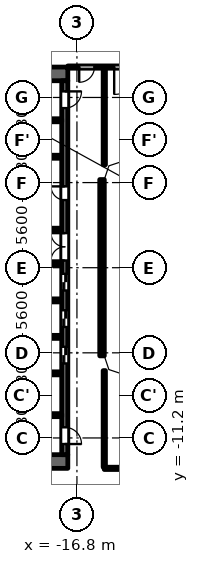
"""IFC4 building model, lengths in metres.
Left out: names, types, materials, properties, quantities, classifications, styles, units other than length and angle.
Written with IfcOpenShell. Run it as: python <this file> out.ifc"""

import sys

from ifc_helpers import new_model, si_unit, direction, frame, frame_2d, origin, place, context, subcontext, project, spatial, polyline, rectangle, outline, extrude, element, fill, save


model = new_model("IFC4")
c1 = context("Model", 3, precision=1e-05, world=origin(), true_north=direction((0.0, 1.0)))
c2 = subcontext(c1, "Body", "Model", "MODEL_VIEW")
j1 = project(units=[si_unit("LENGTHUNIT", "METRE"), si_unit("PLANEANGLEUNIT", "RADIAN")], contexts=[c1])
p1 = place(None, origin())
s1 = spatial("IfcSite", under=j1, at=p1, CompositionType="ELEMENT")
p2 = place(p1, origin())
s2 = spatial("IfcBuilding", under=s1, at=p2, CompositionType="ELEMENT")
p3 = place(p2, frame((0.0, 0.0, 20.9)))
s3 = spatial("IfcBuildingStorey", under=s2, at=p3, CompositionType="ELEMENT", Elevation=20.9)
p4 = place(p3, frame((-15.15, -5.8, 0.0), z_axis=(0.0, 0.0, 1.0), x_axis=(0.0, 1.0, 0.0)))
e1 = element("IfcWall", 1, at=p4, inside=s3, PredefinedType="SOLIDWALL", context=c2, shape_type="SweptSolid", body=[
    extrude(rectangle(XDim=11.6, YDim=0.3, at=frame_2d((5.8, 0.0))), origin(), (0.0, 0.0, 1.0), 4.45),
])
for number, where, z_axis, x_axis in (
    (2, (-17.4, 12.75, 0.0), (0.0, 0.0, 1.0), (-1.0, 0.0, 0.0)),
    (3, (-17.4, -12.75, 0.0), (0.0, 0.0, 1.0), (-1.0, 0.0, 0.0)),
):
    element("IfcWall", number, at=place(p3, frame(where, z_axis=z_axis, x_axis=x_axis)), inside=s3, PredefinedType="SHEAR", context=c2, shape_type="SweptSolid", body=[
        extrude(rectangle(XDim=10.4, YDim=0.9, at=frame_2d((5.2, 0.0))), origin(), (0.0, 0.0, 1.0), 4.45),
    ])
p5 = place(p3, frame((-17.6, -12.3, 0.0), z_axis=(0.0, 0.0, 1.0), x_axis=(0.0, 1.0, 0.0)))
e4 = element("IfcWall", 4, at=p5, inside=s3, PredefinedType="SHEAR", context=c2, shape_type="SweptSolid", body=[
    extrude(rectangle(XDim=24.6, YDim=0.4, at=frame_2d((12.3, 0.0))), origin(), (0.0, 0.0, 1.0), 4.45),
])
p6 = place(p5, frame((6.0, 0.0, 0.0)))
e5 = element("IfcOpeningElement", 5, at=p6, cuts=e4, PredefinedType="OPENING", context=c2, shape_type="SweptSolid", body=[
    extrude(rectangle(XDim=1.1, YDim=2.1, at=frame_2d((0.55, 1.05))), frame((0.0, 0.21, 0.0), z_axis=(0.0, -1.0, 0.0), x_axis=(1.0, 0.0, 0.0)), (0.0, 0.0, 1.0), 0.42),
])
p7 = place(p5, frame((8.4, 0.0, 0.0)))
e6 = element("IfcOpeningElement", 6, at=p7, cuts=e4, PredefinedType="OPENING", context=c2, shape_type="SweptSolid", body=[
    extrude(rectangle(XDim=1.1, YDim=2.1, at=frame_2d((0.55, 1.05))), frame((0.0, 0.21, 0.0), z_axis=(0.0, -1.0, 0.0), x_axis=(1.0, 0.0, 0.0)), (0.0, 0.0, 1.0), 0.42),
])
p8 = place(p5, frame((10.8, 0.0, 0.0)))
e7 = element("IfcOpeningElement", 7, at=p8, cuts=e4, PredefinedType="OPENING", context=c2, shape_type="SweptSolid", body=[
    extrude(rectangle(XDim=1.1, YDim=2.1, at=frame_2d((0.55, 1.05))), frame((0.0, 0.21, 0.0), z_axis=(0.0, -1.0, 0.0), x_axis=(1.0, 0.0, 0.0)), (0.0, 0.0, 1.0), 0.42),
])
p9 = place(p5, frame((16.75, 0.0, 0.0)))
e8 = element("IfcOpeningElement", 8, at=p9, cuts=e4, PredefinedType="OPENING", context=c2, shape_type="SweptSolid", body=[
    extrude(rectangle(XDim=0.9, YDim=2.1, at=frame_2d((0.45, 1.05))), frame((0.0, 0.21, 0.0), z_axis=(0.0, -1.0, 0.0), x_axis=(1.0, 0.0, 0.0)), (0.0, 0.0, 1.0), 0.42),
])
p10 = place(p5, frame((22.8, 0.0, 0.0)))
e9 = element("IfcOpeningElement", 9, at=p10, cuts=e4, PredefinedType="OPENING", context=c2, shape_type="SweptSolid", body=[
    extrude(rectangle(XDim=1.1, YDim=2.1, at=frame_2d((0.55, 1.05))), frame((0.0, 0.21, 0.0), z_axis=(0.0, -1.0, 0.0), x_axis=(1.0, 0.0, 0.0)), (0.0, 0.0, 1.0), 0.42),
])
p11 = place(p5, frame((0.7, 0.0, 0.0)))
e10 = element("IfcOpeningElement", 10, at=p11, cuts=e4, PredefinedType="OPENING", context=c2, shape_type="SweptSolid", body=[
    extrude(rectangle(XDim=1.1, YDim=2.1, at=frame_2d((0.55, 1.05))), frame((0.0, 0.21, 0.0), z_axis=(0.0, -1.0, 0.0), x_axis=(1.0, 0.0, 0.0)), (0.0, 0.0, 1.0), 0.42),
])
p12 = place(p5, frame((12.775, 0.0, 0.0)))
e11 = element("IfcOpeningElement", 11, at=p12, cuts=e4, PredefinedType="OPENING", context=c2, shape_type="SweptSolid", body=[
    extrude(rectangle(XDim=1.8, YDim=2.1, at=frame_2d((0.9, 1.05))), frame((0.0, 0.21, 0.0), z_axis=(0.0, -1.0, 0.0), x_axis=(1.0, 0.0, 0.0)), (0.0, 0.0, 1.0), 0.42),
])
p13 = place(p3, frame((-17.8, -9.7, 0.0), z_axis=(0.0, 0.0, 1.0), x_axis=(-1.0, 0.0, 0.0)))
e12 = element("IfcWall", 12, at=p13, inside=s3, PredefinedType="SHEAR", context=c2, shape_type="SweptSolid", body=[
    extrude(rectangle(XDim=8.3, YDim=0.2, at=frame_2d((4.15, 0.0))), origin(), (0.0, 0.0, 1.0), 4.45),
])
p14 = place(p13, frame((0.85, 0.0, 0.0)))
e13 = element("IfcOpeningElement", 13, at=p14, cuts=e12, PredefinedType="OPENING", context=c2, shape_type="SweptSolid", body=[
    extrude(rectangle(XDim=1.1, YDim=2.1, at=frame_2d((0.55, 1.05))), frame((0.0, 0.11, 0.0), z_axis=(0.0, -1.0, 0.0), x_axis=(1.0, 0.0, 0.0)), (0.0, 0.0, 1.0), 0.22),
])
p15 = place(p13, frame((3.75, 0.0, 0.0)))
e14 = element("IfcOpeningElement", 14, at=p15, cuts=e12, PredefinedType="OPENING", context=c2, shape_type="SweptSolid", body=[
    extrude(rectangle(XDim=1.1, YDim=2.1, at=frame_2d((0.55, 1.05))), frame((0.0, 0.11, 0.0), z_axis=(0.0, -1.0, 0.0), x_axis=(1.0, 0.0, 0.0)), (0.0, 0.0, 1.0), 0.22),
])
for number, where, z_axis, x_axis in (
    (15, (-17.8, -6.95, 0.0), (0.0, 0.0, 1.0), (-1.0, 0.0, 0.0)),
    (16, (-17.8, -4.55, 0.0), (0.0, 0.0, 1.0), (-1.0, 0.0, 0.0)),
    (17, (-17.8, -2.15, 0.0), (0.0, 0.0, 1.0), (-1.0, 0.0, 0.0)),
):
    element("IfcWall", number, at=place(p3, frame(where, z_axis=z_axis, x_axis=x_axis)), inside=s3, PredefinedType="PARTITIONING", context=c2, shape_type="SweptSolid", body=[
        extrude(rectangle(XDim=2.8, YDim=0.2, at=frame_2d((1.4, 0.0))), origin(), (0.0, 0.0, 1.0), 4.45),
    ])
for number, where, z_axis, x_axis in (
    (18, (-17.8, 0.25, 0.0), (0.0, 0.0, 1.0), (-1.0, 0.0, 0.0)),
    (19, (-17.8, 2.5, 0.0), (0.0, 0.0, 1.0), (-1.0, 0.0, 0.0)),
):
    element("IfcWall", number, at=place(p3, frame(where, z_axis=z_axis, x_axis=x_axis)), inside=s3, PredefinedType="PARTITIONING", context=c2, shape_type="SweptSolid", body=[
        extrude(rectangle(XDim=3.0, YDim=0.2, at=frame_2d((1.5, 0.0))), origin(), (0.0, 0.0, 1.0), 4.45),
    ])
p16 = place(p3, frame((-17.8, 7.3, 0.0), z_axis=(0.0, 0.0, 1.0), x_axis=(-1.0, 0.0, 0.0)))
e20 = element("IfcWall", 20, at=p16, inside=s3, PredefinedType="PARTITIONING", context=c2, shape_type="SweptSolid", body=[
    extrude(rectangle(XDim=2.8, YDim=0.2, at=frame_2d((1.4, 0.0))), origin(), (0.0, 0.0, 1.0), 4.45),
])
p17 = place(p3, frame((-17.8, 9.7, 0.0), z_axis=(0.0, 0.0, 1.0), x_axis=(-1.0, 0.0, 0.0)))
e21 = element("IfcWall", 21, at=p17, inside=s3, PredefinedType="SHEAR", context=c2, shape_type="SweptSolid", body=[
    extrude(rectangle(XDim=8.3, YDim=0.2, at=frame_2d((4.15, 0.0))), origin(), (0.0, 0.0, 1.0), 4.45),
])
p18 = place(p17, frame((0.85, 0.0, 0.0)))
e22 = element("IfcOpeningElement", 22, at=p18, cuts=e21, PredefinedType="OPENING", context=c2, shape_type="SweptSolid", body=[
    extrude(rectangle(XDim=1.1, YDim=2.1, at=frame_2d((0.55, 1.05))), frame((0.0, 0.11, 0.0), z_axis=(0.0, -1.0, 0.0), x_axis=(1.0, 0.0, 0.0)), (0.0, 0.0, 1.0), 0.22),
])
p19 = place(p17, frame((3.75, 0.0, 0.0)))
e23 = element("IfcOpeningElement", 23, at=p19, cuts=e21, PredefinedType="OPENING", context=c2, shape_type="SweptSolid", body=[
    extrude(rectangle(XDim=1.1, YDim=2.1, at=frame_2d((0.55, 1.05))), frame((0.0, 0.11, 0.0), z_axis=(0.0, -1.0, 0.0), x_axis=(1.0, 0.0, 0.0)), (0.0, 0.0, 1.0), 0.22),
])
p20 = place(p3, frame((-15.005, -13.2, 0.0), z_axis=(0.0, 0.0, 1.0), x_axis=(1.0, 0.0, 0.0)))
e24 = element("IfcWall", 24, at=p20, inside=s3, PredefinedType="PARTITIONING", context=c2, shape_type="SweptSolid", body=[
    extrude(rectangle(XDim=30.01, YDim=0.15, at=frame_2d((15.005, 0.0))), origin(), (0.0, 0.0, 1.0), 4.45),
])
p21 = place(p20, frame((16.855, 0.0, 0.0)))
e25 = element("IfcOpeningElement", 25, at=p21, cuts=e24, PredefinedType="OPENING", context=c2, shape_type="SweptSolid", body=[
    extrude(rectangle(XDim=1.8, YDim=2.1, at=frame_2d((0.9, 1.05))), frame((0.0, 0.085, 0.0), z_axis=(0.0, -1.0, 0.0), x_axis=(1.0, 0.0, 0.0)), (0.0, 0.0, 1.0), 0.17),
])
p22 = place(p3, frame((-17.4, 13.2, 0.0), z_axis=(0.0, 0.0, 1.0), x_axis=(1.0, 0.0, 0.0)))
e26 = element("IfcWall", 26, at=p22, inside=s3, PredefinedType="PARTITIONING", context=c2, shape_type="SweptSolid", body=[
    extrude(rectangle(XDim=34.8, YDim=0.15, at=frame_2d((17.4, 0.0))), origin(), (0.0, 0.0, 1.0), 4.45),
])
p23 = place(p22, frame((3.05, 0.0, 0.0)))
e27 = element("IfcOpeningElement", 27, at=p23, cuts=e26, PredefinedType="OPENING", context=c2, shape_type="SweptSolid", body=[
    extrude(rectangle(XDim=1.8, YDim=2.1, at=frame_2d((0.9, 1.05))), frame((0.0, 0.085, 0.0), z_axis=(0.0, -1.0, 0.0), x_axis=(1.0, 0.0, 0.0)), (0.0, 0.0, 1.0), 0.17),
])
p24 = place(p22, frame((0.75, 0.0, 0.0)))
e28 = element("IfcOpeningElement", 28, at=p24, cuts=e26, PredefinedType="OPENING", context=c2, shape_type="SweptSolid", body=[
    extrude(rectangle(XDim=1.0, YDim=2.1, at=frame_2d((0.5, 1.05))), frame((0.0, 0.085, 0.0), z_axis=(0.0, -1.0, 0.0), x_axis=(1.0, 0.0, 0.0)), (0.0, 0.0, 1.0), 0.17),
])
p25 = place(p22, frame((33.15, 0.0, 0.0)))
e29 = element("IfcOpeningElement", 29, at=p25, cuts=e26, PredefinedType="OPENING", context=c2, shape_type="SweptSolid", body=[
    extrude(rectangle(XDim=1.0, YDim=2.1, at=frame_2d((0.5, 1.05))), frame((0.0, 0.085, 0.0), z_axis=(0.0, -1.0, 0.0), x_axis=(1.0, 0.0, 0.0)), (0.0, 0.0, 1.0), 0.17),
])
for number, where, z_axis, x_axis in (
    (30, (-15.0, -13.125, 0.0), (0.0, 0.0, 1.0), (0.0, 1.0, 0.0)),
    (31, (-15.0, 6.769, 0.0), (0.0, 0.0, 1.0), (0.0, 1.0, 0.0)),
):
    element("IfcWall", number, at=place(p3, frame(where, z_axis=z_axis, x_axis=x_axis)), inside=s3, PredefinedType="PARTITIONING", context=c2, shape_type="SweptSolid", body=[
        extrude(rectangle(XDim=6.356, YDim=0.15, at=frame_2d((3.178, 0.0))), origin(), (0.0, 0.0, 1.0), 4.45),
    ])
p26 = place(p3, origin())
e32 = element("IfcWall", 32, at=p26, inside=s3, PredefinedType="SOLIDWALL", context=c2, shape_type="SweptSolid", body=[
    extrude(outline(polyline([(-13.849, 7.3), (-14.937, 6.937), (-15.3, 5.849), (-15.3, 5.8), (-15.0, 5.8), (-14.7, 6.7), (-13.8, 7.0), (-13.8, 7.3), (-13.849, 7.3)])), origin(), (0.0, 0.0, 1.0), 4.45),
])
e33 = element("IfcWall", 33, at=p26, inside=s3, PredefinedType="SOLIDWALL", context=c2, shape_type="SweptSolid", body=[
    extrude(outline(polyline([(-14.937, -6.937), (-13.849, -7.3), (-13.8, -7.3), (-13.8, -7.0), (-14.7, -6.7), (-15.0, -5.8), (-15.3, -5.8), (-15.3, -5.849), (-14.937, -6.937)])), origin(), (0.0, 0.0, 1.0), 4.45),
])
p27 = place(p6, origin())
e34 = element("IfcDoor", 34, at=p27, inside=s3, OperationType="DOUBLE_DOOR_SLIDING", PredefinedType="DOOR", context=c2, shape_type="SweptSolid", body=[
    extrude(rectangle(XDim=1.1, YDim=2.1, at=frame_2d((0.55, 1.05))), frame((0.0, 0.025, 0.0), z_axis=(0.0, -1.0, 0.0), x_axis=(1.0, 0.0, 0.0)), (0.0, 0.0, 1.0), 0.05),
])
fill(e5, e34)
p28 = place(p7, origin())
e35 = element("IfcDoor", 35, at=p28, inside=s3, OperationType="DOUBLE_DOOR_SLIDING", PredefinedType="DOOR", context=c2, shape_type="SweptSolid", body=[
    extrude(rectangle(XDim=1.1, YDim=2.1, at=frame_2d((0.55, 1.05))), frame((0.0, 0.025, 0.0), z_axis=(0.0, -1.0, 0.0), x_axis=(1.0, 0.0, 0.0)), (0.0, 0.0, 1.0), 0.05),
])
fill(e6, e35)
p29 = place(p8, origin())
e36 = element("IfcDoor", 36, at=p29, inside=s3, OperationType="DOUBLE_DOOR_SLIDING", PredefinedType="DOOR", context=c2, shape_type="SweptSolid", body=[
    extrude(rectangle(XDim=1.1, YDim=2.1, at=frame_2d((0.55, 1.05))), frame((0.0, 0.025, 0.0), z_axis=(0.0, -1.0, 0.0), x_axis=(1.0, 0.0, 0.0)), (0.0, 0.0, 1.0), 0.05),
])
fill(e7, e36)
p30 = place(p9, origin())
e37 = element("IfcDoor", 37, at=p30, inside=s3, OperationType="SINGLE_SWING_LEFT", PredefinedType="DOOR", context=c2, shape_type="SweptSolid", body=[
    extrude(rectangle(XDim=0.9, YDim=2.1, at=frame_2d((0.45, 1.05))), frame((0.0, 0.025, 0.0), z_axis=(0.0, -1.0, 0.0), x_axis=(1.0, 0.0, 0.0)), (0.0, 0.0, 1.0), 0.05),
])
fill(e8, e37)
p31 = place(p10, origin())
e38 = element("IfcDoor", 38, at=p31, inside=s3, OperationType="SINGLE_SWING_RIGHT", PredefinedType="DOOR", context=c2, shape_type="SweptSolid", body=[
    extrude(rectangle(XDim=1.1, YDim=2.1, at=frame_2d((0.55, 1.05))), frame((0.0, 0.025, 0.0), z_axis=(0.0, -1.0, 0.0), x_axis=(1.0, 0.0, 0.0)), (0.0, 0.0, 1.0), 0.05),
])
fill(e9, e38)
p32 = place(p11, origin())
e39 = element("IfcDoor", 39, at=p32, inside=s3, OperationType="SINGLE_SWING_LEFT", PredefinedType="DOOR", context=c2, shape_type="SweptSolid", body=[
    extrude(rectangle(XDim=1.1, YDim=2.1, at=frame_2d((0.55, 1.05))), frame((0.0, 0.025, 0.0), z_axis=(0.0, -1.0, 0.0), x_axis=(1.0, 0.0, 0.0)), (0.0, 0.0, 1.0), 0.05),
])
fill(e10, e39)
p33 = place(p12, origin())
e40 = element("IfcDoor", 40, at=p33, inside=s3, OperationType="DOUBLE_DOOR_SINGLE_SWING", PredefinedType="DOOR", context=c2, shape_type="SweptSolid", body=[
    extrude(rectangle(XDim=1.8, YDim=2.1, at=frame_2d((0.9, 1.05))), frame((0.0, 0.025, 0.0), z_axis=(0.0, -1.0, 0.0), x_axis=(1.0, 0.0, 0.0)), (0.0, 0.0, 1.0), 0.05),
])
fill(e11, e40)
p34 = place(p23, origin())
e41 = element("IfcDoor", 41, at=p34, inside=s3, OperationType="SINGLE_SWING_LEFT", PredefinedType="DOOR", context=c2, shape_type="SweptSolid", body=[
    extrude(rectangle(XDim=1.8, YDim=2.1, at=frame_2d((0.9, 1.05))), frame((0.0, 0.025, 0.0), z_axis=(0.0, -1.0, 0.0), x_axis=(1.0, 0.0, 0.0)), (0.0, 0.0, 1.0), 0.05),
])
fill(e27, e41)
p35 = place(p24, origin())
e42 = element("IfcDoor", 42, at=p35, inside=s3, OperationType="SINGLE_SWING_LEFT", PredefinedType="DOOR", context=c2, shape_type="SweptSolid", body=[
    extrude(rectangle(XDim=1.0, YDim=2.1, at=frame_2d((0.5, 1.05))), frame((0.0, 0.025, 0.0), z_axis=(0.0, -1.0, 0.0), x_axis=(1.0, 0.0, 0.0)), (0.0, 0.0, 1.0), 0.05),
])
fill(e28, e42)
save(model, sys.argv[1])
